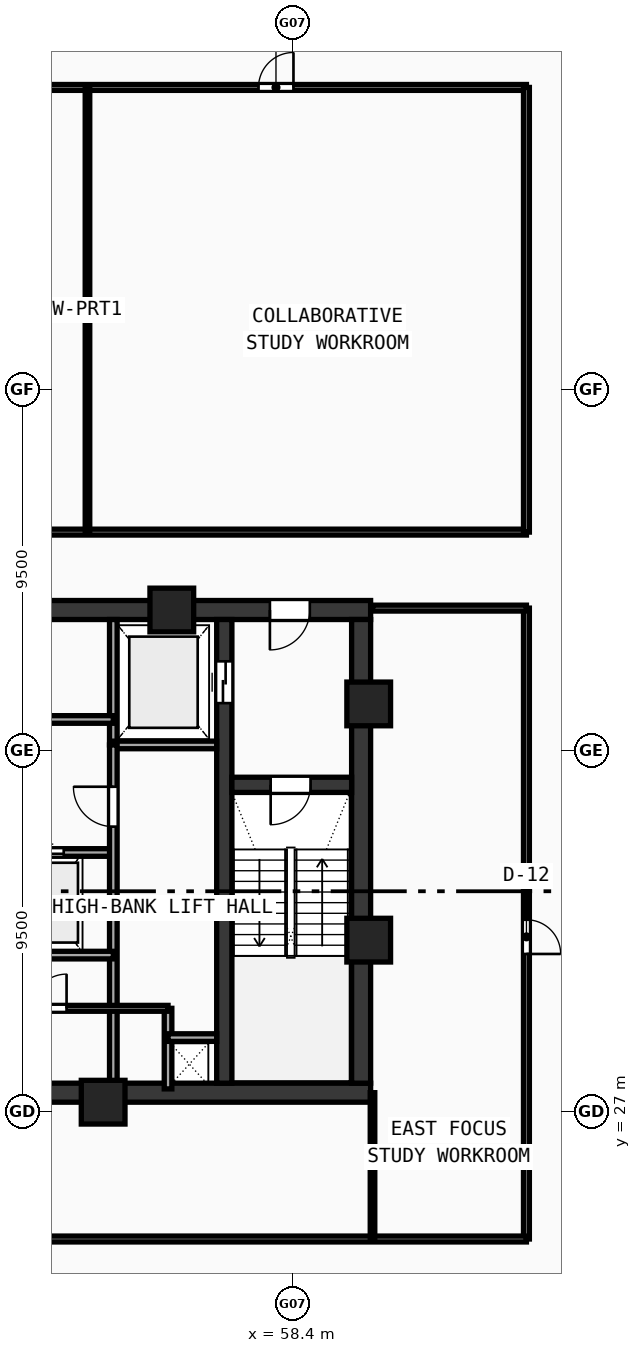
"""IFC4 building model, lengths in metres.
Left out: names, types, materials, properties, quantities, classifications, styles, units other than length and angle.
Written with IfcOpenShell. Run it as: python <this file> out.ifc"""

import sys

from ifc_helpers import new_model, si_unit, direction, frame, frame_2d, origin, origin_with_axes, origin_2d, place, context, subcontext, project, spatial, rectangle, hollow_rectangle, extrude, source, transform, mapped, element, fill, save


model = new_model("IFC4")
c1 = context("Model", 3, precision=1e-05, world=origin(), true_north=direction((0.0, 1.0)))
c2 = subcontext(c1, "Body", "Model", "MODEL_VIEW")
j1 = project(units=[si_unit("LENGTHUNIT", "METRE"), si_unit("PLANEANGLEUNIT", "RADIAN")], contexts=[c1])
p1 = place(None, origin())
s1 = spatial("IfcSite", under=j1, at=p1, CompositionType="ELEMENT")
p2 = place(p1, origin())
s2 = spatial("IfcBuilding", under=s1, at=p2, CompositionType="ELEMENT")
p3 = place(p2, frame((0.0, 0.0, 196.16)))
s3 = spatial("IfcBuildingStorey", under=s2, at=p3, CompositionType="ELEMENT", Elevation=196.16)
p4 = place(p3, frame((35.55, 27.5, 0.0), z_axis=(0.0, 0.0, 1.0), x_axis=(1.0, 0.0, 0.0)))
e1 = element("IfcWall", 1, at=p4, inside=s3, PredefinedType="SHEAR", context=c2, shape_type="SweptSolid", body=[
    extrude(rectangle(XDim=24.9, YDim=0.5, at=frame_2d((12.45, 0.0))), origin(), (0.0, 0.0, 1.0), 3.54),
])
p5 = place(p3, frame((49.2, 40.2, 0.0), z_axis=(0.0, 0.0, 1.0), x_axis=(1.0, 0.0, 0.0)))
e2 = element("IfcWall", 2, at=p5, inside=s3, PredefinedType="SHEAR", context=c2, shape_type="SweptSolid", body=[
    extrude(rectangle(XDim=11.25, YDim=0.5, at=frame_2d((5.625, 0.0))), origin(), (0.0, 0.0, 1.0), 3.54),
])
p6 = place(p5, frame((8.6, 0.0, 0.0)))
e3 = element("IfcOpeningElement", 3, at=p6, cuts=e2, PredefinedType="OPENING", context=c2, shape_type="SweptSolid", body=[
    extrude(rectangle(XDim=1.05, YDim=2.1, at=frame_2d((0.525, 1.05))), frame((0.0, 0.26, 0.0), z_axis=(0.0, -1.0, 0.0), x_axis=(1.0, 0.0, 0.0)), (0.0, 0.0, 1.0), 0.52),
])
p7 = place(p3, frame((60.2, 27.75, 0.0), z_axis=(0.0, 0.0, 1.0), x_axis=(0.0, 1.0, 0.0)))
e4 = element("IfcWall", 4, at=p7, inside=s3, PredefinedType="SHEAR", context=c2, shape_type="SweptSolid", body=[
    extrude(rectangle(XDim=12.2, YDim=0.5, at=frame_2d((6.1, 0.0))), origin(), (0.0, 0.0, 1.0), 3.54),
])
p8 = place(p3, frame((56.6, 27.75, 0.0), z_axis=(0.0, 0.0, 1.0), x_axis=(0.0, 1.0, 0.0)))
e5 = element("IfcWall", 5, at=p8, inside=s3, PredefinedType="SHEAR", context=c2, shape_type="SweptSolid", body=[
    extrude(rectangle(XDim=12.2, YDim=0.4, at=frame_2d((6.1, 0.0))), origin(), (0.0, 0.0, 1.0), 3.54),
])
p9 = place(p8, frame((10.0, 0.0, 0.0)))
e6 = element("IfcOpeningElement", 6, at=p9, cuts=e5, PredefinedType="OPENING", context=c2, shape_type="SweptSolid", body=[
    extrude(rectangle(XDim=1.1, YDim=2.1, at=frame_2d((0.55, 1.05))), frame((0.0, 0.21, 0.0), z_axis=(0.0, -1.0, 0.0), x_axis=(1.0, 0.0, 0.0)), (0.0, 0.0, 1.0), 0.42),
])
p10 = place(p3, frame((56.8, 35.6, 0.0), z_axis=(0.0, 0.0, 1.0), x_axis=(1.0, 0.0, 0.0)))
e7 = element("IfcWall", 7, at=p10, inside=s3, PredefinedType="SHEAR", context=c2, shape_type="SweptSolid", body=[
    extrude(rectangle(XDim=3.15, YDim=0.4, at=frame_2d((1.575, 0.0))), origin(), (0.0, 0.0, 1.0), 3.54),
])
p11 = place(p10, frame((1.02, 0.0, 0.0)))
e8 = element("IfcOpeningElement", 8, at=p11, cuts=e7, PredefinedType="OPENING", context=c2, shape_type="SweptSolid", body=[
    extrude(rectangle(XDim=1.05, YDim=2.1, at=frame_2d((0.525, 1.05))), frame((0.0, 0.21, 0.0), z_axis=(0.0, -1.0, 0.0), x_axis=(1.0, 0.0, 0.0)), (0.0, 0.0, 1.0), 0.42),
])
m1 = source(origin(), c2, "Body", "SweptSolid", [
    extrude(hollow_rectangle(XDim=1.15, YDim=1.15, WallThickness=0.048, at=origin_2d()), origin(), (0.0, 0.0, 1.0), 3.8),
])
for number, where, z_axis, x_axis in (
    (9, (53.412, 27.25, -0.26), (0.0, 0.0, 1.0), (1.0, 0.0, 0.0)),
    (10, (60.4, 31.513, -0.26), (0.0, 0.0, 1.0), (1.0, 0.0, 0.0)),
    (11, (60.4, 37.729, -0.26), (0.0, 0.0, 1.0), (1.0, 0.0, 0.0)),
    (12, (55.219, 40.2, -0.26), (0.0, 0.0, 1.0), (1.0, 0.0, 0.0)),
):
    element("IfcColumn", number, at=place(p3, frame(where, z_axis=z_axis, x_axis=x_axis)), inside=s3, PredefinedType="COLUMN", context=c2, shape_type="MappedRepresentation", body=[
        mapped(m1, transform((0.0, 0.0, 0.0), scale=1.0)),
    ])
p12 = place(p3, frame((53.68, 36.65, 0.0), z_axis=(0.0, 0.0, 1.0), x_axis=(0.0, 1.0, 0.0)))
e13 = element("IfcWall", 13, at=p12, inside=s3, PredefinedType="SOLIDWALL", context=c2, shape_type="SweptSolid", body=[
    extrude(rectangle(XDim=3.3, YDim=0.2, at=frame_2d((1.65, 0.0))), origin(), (0.0, 0.0, 1.0), 3.54),
])
p13 = place(p3, frame((53.68, 36.65, 0.0), z_axis=(0.0, 0.0, 1.0), x_axis=(1.0, 0.0, 0.0)))
e14 = element("IfcWall", 14, at=p13, inside=s3, PredefinedType="SOLIDWALL", context=c2, shape_type="SweptSolid", body=[
    extrude(rectangle(XDim=2.72, YDim=0.2, at=frame_2d((1.36, 0.0))), origin(), (0.0, 0.0, 1.0), 3.54),
])
p14 = place(p3, frame((48.95, 37.32, 0.0), z_axis=(0.0, 0.0, 1.0), x_axis=(1.0, 0.0, 0.0)))
e15 = element("IfcWall", 15, at=p14, inside=s3, PredefinedType="SOLIDWALL", context=c2, shape_type="SweptSolid", body=[
    extrude(rectangle(XDim=4.73, YDim=0.2, at=frame_2d((2.365, 0.0))), origin(), (0.0, 0.0, 1.0), 3.54),
])
p15 = place(p14, frame((1.8, 0.0, 0.0)))
e16 = element("IfcOpeningElement", 16, at=p15, cuts=e15, PredefinedType="OPENING", context=c2, shape_type="SweptSolid", body=[
    extrude(rectangle(XDim=0.9, YDim=2.1, at=frame_2d((0.45, 1.05))), frame((0.0, 0.11, 0.0), z_axis=(0.0, -1.0, 0.0), x_axis=(1.0, 0.0, 0.0)), (0.0, 0.0, 1.0), 0.22),
])
p16 = place(p3, frame((43.85, 33.82, 0.0), z_axis=(0.0, 0.0, 1.0), x_axis=(1.0, 0.0, 0.0)))
e17 = element("IfcWall", 17, at=p16, inside=s3, PredefinedType="SOLIDWALL", context=c2, shape_type="SweptSolid", body=[
    extrude(rectangle(XDim=9.83, YDim=0.2, at=frame_2d((4.915, 0.0))), origin(), (0.0, 0.0, 1.0), 3.54),
])
p17 = place(p16, frame((0.575, 0.0, 0.0)))
e18 = element("IfcOpeningElement", 18, at=p17, cuts=e17, PredefinedType="OPENING", context=c2, shape_type="SweptSolid", body=[
    extrude(rectangle(XDim=1.05, YDim=2.1, at=frame_2d((0.525, 1.05))), frame((0.0, 0.11, 0.0), z_axis=(0.0, -1.0, 0.0), x_axis=(1.0, 0.0, 0.0)), (0.0, 0.0, 1.0), 0.22),
])
p18 = place(p16, frame((2.875, 0.0, 0.0)))
e19 = element("IfcOpeningElement", 19, at=p18, cuts=e17, PredefinedType="OPENING", context=c2, shape_type="SweptSolid", body=[
    extrude(rectangle(XDim=1.05, YDim=2.1, at=frame_2d((0.525, 1.05))), frame((0.0, 0.11, 0.0), z_axis=(0.0, -1.0, 0.0), x_axis=(1.0, 0.0, 0.0)), (0.0, 0.0, 1.0), 0.22),
])
p19 = place(p16, frame((5.175, 0.0, 0.0)))
e20 = element("IfcOpeningElement", 20, at=p19, cuts=e17, PredefinedType="OPENING", context=c2, shape_type="SweptSolid", body=[
    extrude(rectangle(XDim=1.05, YDim=2.1, at=frame_2d((0.525, 1.05))), frame((0.0, 0.11, 0.0), z_axis=(0.0, -1.0, 0.0), x_axis=(1.0, 0.0, 0.0)), (0.0, 0.0, 1.0), 0.22),
])
p20 = place(p16, frame((7.475, 0.0, 0.0)))
e21 = element("IfcOpeningElement", 21, at=p20, cuts=e17, PredefinedType="OPENING", context=c2, shape_type="SweptSolid", body=[
    extrude(rectangle(XDim=1.05, YDim=2.1, at=frame_2d((0.525, 1.05))), frame((0.0, 0.11, 0.0), z_axis=(0.0, -1.0, 0.0), x_axis=(1.0, 0.0, 0.0)), (0.0, 0.0, 1.0), 0.22),
])
p21 = place(p3, frame((53.68, 27.6, 0.0), z_axis=(0.0, 0.0, 1.0), x_axis=(0.0, 1.0, 0.0)))
e22 = element("IfcWall", 22, at=p21, inside=s3, PredefinedType="SOLIDWALL", context=c2, shape_type="SweptSolid", body=[
    extrude(rectangle(XDim=9.05, YDim=0.2, at=frame_2d((4.525, 0.0))), origin(), (0.0, 0.0, 1.0), 3.54),
])
p22 = place(p21, frame((6.9, 0.0, 0.0)))
e23 = element("IfcOpeningElement", 23, at=p22, cuts=e22, PredefinedType="OPENING", context=c2, shape_type="SweptSolid", body=[
    extrude(rectangle(XDim=1.05, YDim=2.1, at=frame_2d((0.525, 1.05))), frame((0.0, 0.11, 0.0), z_axis=(0.0, -1.0, 0.0), x_axis=(1.0, 0.0, 0.0)), (0.0, 0.0, 1.0), 0.22),
])
p23 = place(p3, frame((43.85, 31.12, 0.0), z_axis=(0.0, 0.0, 1.0), x_axis=(1.0, 0.0, 0.0)))
e24 = element("IfcWall", 24, at=p23, inside=s3, PredefinedType="SOLIDWALL", context=c2, shape_type="SweptSolid", body=[
    extrude(rectangle(XDim=9.83, YDim=0.2, at=frame_2d((4.915, 0.0))), origin(), (0.0, 0.0, 1.0), 3.54),
])
p24 = place(p3, frame((55.12, 27.6, 0.0), z_axis=(0.0, 0.0, 1.0), x_axis=(0.0, 1.0, 0.0)))
e25 = element("IfcWall", 25, at=p24, inside=s3, PredefinedType="SOLIDWALL", context=c2, shape_type="SweptSolid", body=[
    extrude(rectangle(XDim=2.12, YDim=0.2, at=frame_2d((1.06, 0.0))), origin(), (0.0, 0.0, 1.0), 3.54),
])
p25 = place(p3, frame((55.12, 28.95, 0.0), z_axis=(0.0, 0.0, 1.0), x_axis=(1.0, 0.0, 0.0)))
e26 = element("IfcWall", 26, at=p25, inside=s3, PredefinedType="SOLIDWALL", context=c2, shape_type="SweptSolid", body=[
    extrude(rectangle(XDim=1.28, YDim=0.2, at=frame_2d((0.64, 0.0))), origin(), (0.0, 0.0, 1.0), 3.54),
])
p26 = place(p3, frame((51.05, 29.72, 0.0), z_axis=(0.0, 0.0, 1.0), x_axis=(1.0, 0.0, 0.0)))
e27 = element("IfcWall", 27, at=p26, inside=s3, PredefinedType="PARTITIONING", context=c2, shape_type="SweptSolid", body=[
    extrude(rectangle(XDim=4.07, YDim=0.155, at=frame_2d((2.035, 0.0))), origin(), (0.0, 0.0, 1.0), 3.54),
])
p27 = place(p26, frame((0.5, 0.0, 0.0)))
e28 = element("IfcOpeningElement", 28, at=p27, cuts=e27, PredefinedType="OPENING", context=c2, shape_type="SweptSolid", body=[
    extrude(rectangle(XDim=0.9, YDim=2.1, at=frame_2d((0.45, 1.05))), frame((0.0, 0.087, 0.0), z_axis=(0.0, -1.0, 0.0), x_axis=(1.0, 0.0, 0.0)), (0.0, 0.0, 1.0), 0.175),
])
p28 = place(p3, frame((31.45, 42.25, 0.0), z_axis=(0.0, 0.0, 1.0), x_axis=(1.0, 0.0, 0.0)))
e29 = element("IfcWall", 29, at=p28, inside=s3, PredefinedType="PARTITIONING", context=c2, shape_type="SweptSolid", body=[
    extrude(rectangle(XDim=33.1, YDim=0.155, at=frame_2d((16.55, 0.0))), origin(), (0.0, 0.0, 1.0), 2.89),
])
p29 = place(p3, frame((31.45, 53.95, 0.0), z_axis=(0.0, 0.0, 1.0), x_axis=(1.0, 0.0, 0.0)))
e30 = element("IfcWall", 30, at=p29, inside=s3, PredefinedType="PARTITIONING", context=c2, shape_type="SweptSolid", body=[
    extrude(rectangle(XDim=33.1, YDim=0.155, at=frame_2d((16.55, 0.0))), origin(), (0.0, 0.0, 1.0), 2.89),
])
p30 = place(p29, frame((8.0, 0.0, 0.0)))
e31 = element("IfcOpeningElement", 31, at=p30, cuts=e30, PredefinedType="OPENING", context=c2, shape_type="SweptSolid", body=[
    extrude(rectangle(XDim=0.92, YDim=2.1, at=frame_2d((0.46, 1.05))), frame((0.0, 0.087, 0.0), z_axis=(0.0, -1.0, 0.0), x_axis=(1.0, 0.0, 0.0)), (0.0, 0.0, 1.0), 0.175),
])
p31 = place(p29, frame((26.05, 0.0, 0.0)))
e32 = element("IfcOpeningElement", 32, at=p31, cuts=e30, PredefinedType="OPENING", context=c2, shape_type="SweptSolid", body=[
    extrude(rectangle(XDim=0.92, YDim=2.1, at=frame_2d((0.46, 1.05))), frame((0.0, 0.087, 0.0), z_axis=(0.0, -1.0, 0.0), x_axis=(1.0, 0.0, 0.0)), (0.0, 0.0, 1.0), 0.175),
])
p32 = place(p3, frame((64.55, 42.25, 0.0), z_axis=(0.0, 0.0, 1.0), x_axis=(0.0, 1.0, 0.0)))
e33 = element("IfcWall", 33, at=p32, inside=s3, PredefinedType="PARTITIONING", context=c2, shape_type="SweptSolid", body=[
    extrude(rectangle(XDim=11.7, YDim=0.155, at=frame_2d((5.85, 0.0))), origin(), (0.0, 0.0, 1.0), 2.89),
])
p33 = place(p3, frame((53.0, 42.25, 0.0), z_axis=(0.0, 0.0, 1.0), x_axis=(0.0, 1.0, 0.0)))
e34 = element("IfcWall", 34, at=p33, inside=s3, PredefinedType="PARTITIONING", context=c2, shape_type="SweptSolid", body=[
    extrude(rectangle(XDim=11.7, YDim=0.12, at=frame_2d((5.85, 0.0))), origin(), (0.0, 0.0, 1.0), 2.89),
])
p34 = place(p3, frame((64.55, 23.65, 0.0), z_axis=(0.0, 0.0, 1.0), x_axis=(0.0, 1.0, 0.0)))
e35 = element("IfcWall", 35, at=p34, inside=s3, PredefinedType="PARTITIONING", context=c2, shape_type="SweptSolid", body=[
    extrude(rectangle(XDim=16.6, YDim=0.155, at=frame_2d((8.3, 0.0))), origin(), (0.0, 0.0, 1.0), 2.89),
])
p35 = place(p34, frame((7.5, 0.0, 0.0)))
e36 = element("IfcOpeningElement", 36, at=p35, cuts=e35, PredefinedType="OPENING", context=c2, shape_type="SweptSolid", body=[
    extrude(rectangle(XDim=0.9, YDim=2.08, at=frame_2d((0.45, 1.04))), frame((0.0, 0.087, 0.0), z_axis=(0.0, -1.0, 0.0), x_axis=(1.0, 0.0, 0.0)), (0.0, 0.0, 1.0), 0.175),
])
p36 = place(p3, frame((31.45, 23.65, 0.0), z_axis=(0.0, 0.0, 1.0), x_axis=(1.0, 0.0, 0.0)))
e37 = element("IfcWall", 37, at=p36, inside=s3, PredefinedType="PARTITIONING", context=c2, shape_type="SweptSolid", body=[
    extrude(rectangle(XDim=33.1, YDim=0.155, at=frame_2d((16.55, 0.0))), origin(), (0.0, 0.0, 1.0), 2.89),
])
p37 = place(p36, frame((16.0, 0.0, 0.0)))
e38 = element("IfcOpeningElement", 38, at=p37, cuts=e37, PredefinedType="OPENING", context=c2, shape_type="SweptSolid", body=[
    extrude(rectangle(XDim=0.92, YDim=2.1, at=frame_2d((0.46, 1.05))), frame((0.0, 0.087, 0.0), z_axis=(0.0, -1.0, 0.0), x_axis=(1.0, 0.0, 0.0)), (0.0, 0.0, 1.0), 0.175),
])
p38 = place(p3, frame((60.5, 40.25, 0.0), z_axis=(0.0, 0.0, 1.0), x_axis=(1.0, 0.0, 0.0)))
e39 = element("IfcWall", 39, at=p38, inside=s3, PredefinedType="PARTITIONING", context=c2, shape_type="SweptSolid", body=[
    extrude(rectangle(XDim=4.05, YDim=0.155, at=frame_2d((2.025, 0.0))), origin(), (0.0, 0.0, 1.0), 3.54),
])
p39 = place(p3, frame((60.5, 23.65, 0.0), z_axis=(0.0, 0.0, 1.0), x_axis=(0.0, 1.0, 0.0)))
e40 = element("IfcWall", 40, at=p39, inside=s3, PredefinedType="PARTITIONING", context=c2, shape_type="SweptSolid", body=[
    extrude(rectangle(XDim=3.85, YDim=0.12, at=frame_2d((1.925, 0.0))), origin(), (0.0, 0.0, 1.0), 3.14),
])
m2 = source(origin(), c2, "Body", "SweptSolid", [
    extrude(rectangle(XDim=1.05, YDim=2.1, at=frame_2d((0.525, 1.05))), frame((0.0, 0.025, 0.0), z_axis=(0.0, -1.0, 0.0), x_axis=(1.0, 0.0, 0.0)), (0.0, 0.0, 1.0), 0.05),
])
p40 = place(p11, frame((1.05, 0.0, 0.0), z_axis=(0.0, 0.0, 1.0), x_axis=(-1.0, 0.0, 0.0)))
e41 = element("IfcDoor", 41, at=p40, inside=s3, OperationType="SINGLE_SWING_RIGHT", PredefinedType="DOOR", context=c2, shape_type="MappedRepresentation", body=[
    mapped(m2, transform((0.0, 0.0, 0.0), scale=1.0)),
])
fill(e8, e41)
p41 = place(p6, frame((1.05, 0.0, 0.0), z_axis=(0.0, 0.0, 1.0), x_axis=(-1.0, 0.0, 0.0)))
e42 = element("IfcDoor", 42, at=p41, inside=s3, OperationType="SINGLE_SWING_RIGHT", PredefinedType="DOOR", context=c2, shape_type="MappedRepresentation", body=[
    mapped(m2, transform((0.0, 0.0, 0.0), scale=1.0)),
])
fill(e3, e42)
m3 = source(origin(), c2, "Body", "SweptSolid", [
    extrude(rectangle(XDim=1.1, YDim=2.1, at=frame_2d((0.55, 1.05))), frame((0.0, 0.025, 0.0), z_axis=(0.0, -1.0, 0.0), x_axis=(1.0, 0.0, 0.0)), (0.0, 0.0, 1.0), 0.05),
])
p42 = place(p9, origin_with_axes())
e43 = element("IfcDoor", 43, at=p42, inside=s3, OperationType="DOUBLE_DOOR_SLIDING", PredefinedType="DOOR", context=c2, shape_type="MappedRepresentation", body=[
    mapped(m3, transform((0.0, 0.0, 0.0), scale=1.0)),
])
fill(e6, e43)
p43 = place(p20, origin_with_axes())
e44 = element("IfcDoor", 44, at=p43, inside=s3, OperationType="DOUBLE_DOOR_SLIDING", PredefinedType="DOOR", context=c2, shape_type="MappedRepresentation", body=[
    mapped(m2, transform((0.0, 0.0, 0.0), scale=1.0)),
])
fill(e21, e44)
p44 = place(p22, origin_with_axes())
e45 = element("IfcDoor", 45, at=p44, inside=s3, OperationType="SINGLE_SWING_RIGHT", PredefinedType="DOOR", context=c2, shape_type="MappedRepresentation", body=[
    mapped(m2, transform((0.0, 0.0, 0.0), scale=1.0)),
])
fill(e23, e45)
m4 = source(origin(), c2, "Body", "SweptSolid", [
    extrude(rectangle(XDim=0.9, YDim=2.1, at=frame_2d((0.45, 1.05))), frame((0.0, 0.025, 0.0), z_axis=(0.0, -1.0, 0.0), x_axis=(1.0, 0.0, 0.0)), (0.0, 0.0, 1.0), 0.05),
])
p45 = place(p27, origin_with_axes())
e46 = element("IfcDoor", 46, at=p45, inside=s3, OperationType="SINGLE_SWING_RIGHT", PredefinedType="DOOR", context=c2, shape_type="MappedRepresentation", body=[
    mapped(m4, transform((0.0, 0.0, 0.0), scale=1.0)),
])
fill(e28, e46)
m5 = source(origin(), c2, "Body", "SweptSolid", [
    extrude(rectangle(XDim=0.92, YDim=2.1, at=frame_2d((0.46, 1.05))), frame((0.0, 0.025, 0.0), z_axis=(0.0, -1.0, 0.0), x_axis=(1.0, 0.0, 0.0)), (0.0, 0.0, 1.0), 0.05),
])
p46 = place(p31, origin_with_axes())
e47 = element("IfcDoor", 47, at=p46, inside=s3, OperationType="SINGLE_SWING_RIGHT", PredefinedType="DOOR", context=c2, shape_type="MappedRepresentation", body=[
    mapped(m5, transform((0.0, 0.0, 0.0), scale=1.0)),
])
fill(e32, e47)
m6 = source(origin(), c2, "Body", "SweptSolid", [
    extrude(rectangle(XDim=0.9, YDim=2.08, at=frame_2d((0.45, 1.04))), frame((0.0, 0.025, 0.0), z_axis=(0.0, -1.0, 0.0), x_axis=(1.0, 0.0, 0.0)), (0.0, 0.0, 1.0), 0.05),
])
p47 = place(p35, frame((0.9, 0.0, 0.0), z_axis=(0.0, 0.0, 1.0), x_axis=(-1.0, 0.0, 0.0)))
e48 = element("IfcDoor", 48, at=p47, inside=s3, OperationType="SINGLE_SWING_RIGHT", PredefinedType="DOOR", context=c2, shape_type="MappedRepresentation", body=[
    mapped(m6, transform((0.0, 0.0, 0.0), scale=1.0)),
])
fill(e36, e48)
save(model, sys.argv[1])
